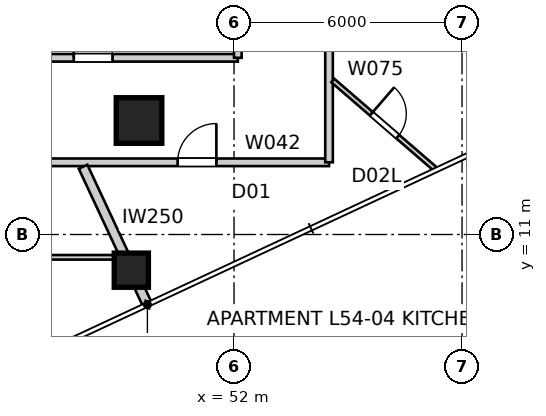
"""IFC4 building model, lengths in metres.
Left out: names, types, materials, properties, quantities, classifications, styles, units other than length and angle.
Written with IfcOpenShell. Run it as: python <this file> out.ifc"""

import sys

from ifc_helpers import new_model, si_unit, direction, frame, frame_2d, origin, origin_2d, place, context, subcontext, project, spatial, rectangle, extrude, element, fill, save


model = new_model("IFC4")
c1 = context("Model", 3, precision=1e-05, world=origin(), true_north=direction((0.0, 1.0)))
c2 = subcontext(c1, "Body", "Model", "MODEL_VIEW")
j1 = project(units=[si_unit("LENGTHUNIT", "METRE"), si_unit("PLANEANGLEUNIT", "RADIAN")], contexts=[c1])
p1 = place(None, origin())
s1 = spatial("IfcSite", under=j1, at=p1, CompositionType="ELEMENT")
p2 = place(p1, origin())
s2 = spatial("IfcBuilding", under=s1, at=p2, CompositionType="ELEMENT")
p3 = place(p2, frame((0.0, 0.0, 196.4)))
s3 = spatial("IfcBuildingStorey", under=s2, at=p3, CompositionType="ELEMENT", Elevation=196.4)
p4 = place(p3, frame((49.298, 10.061, 0.0), z_axis=(0.0, 0.0, 1.0), x_axis=(1.0, 0.0, 0.0)))
e1 = element("IfcColumn", 1, at=p4, inside=s3, PredefinedType="COLUMN", context=c2, shape_type="SweptSolid", body=[
    extrude(rectangle(XDim=0.9, YDim=0.9, at=origin_2d()), origin(), (0.0, 0.0, 1.0), 3.4),
])
p5 = place(p3, frame((49.5, 14.0, 0.0), z_axis=(0.0, 0.0, 1.0), x_axis=(1.0, 0.0, 0.0)))
e2 = element("IfcColumn", 2, at=p5, inside=s3, PredefinedType="COLUMN", context=c2, shape_type="SweptSolid", body=[
    extrude(rectangle(XDim=1.2, YDim=1.2, at=origin_2d()), origin(), (0.0, 0.0, 1.0), 3.4),
])
p6 = place(p3, frame((46.308, 12.9, 0.0), z_axis=(0.0, 0.0, 1.0), x_axis=(1.0, 0.0, 0.0)))
e3 = element("IfcWall", 3, at=p6, inside=s3, PredefinedType="PARTITIONING", context=c2, shape_type="SweptSolid", body=[
    extrude(rectangle(XDim=8.192, YDim=0.2, at=frame_2d((4.096, 0.0))), origin(), (0.0, 0.0, 1.0), 3.25),
])
p7 = place(p6, frame((4.207, 0.0, 0.0)))
e4 = element("IfcOpeningElement", 4, at=p7, cuts=e3, PredefinedType="OPENING", context=c2, shape_type="SweptSolid", body=[
    extrude(rectangle(XDim=1.02, YDim=2.34, at=frame_2d((0.51, 1.17))), frame((0.0, 0.11, 0.0), z_axis=(0.0, -1.0, 0.0), x_axis=(1.0, 0.0, 0.0)), (0.0, 0.0, 1.0), 0.22),
])
p8 = place(p3, frame((54.5, 12.9, 0.0), z_axis=(0.0, 0.0, 1.0), x_axis=(0.0, 1.0, 0.0)))
e5 = element("IfcWall", 5, at=p8, inside=s3, PredefinedType="PARTITIONING", context=c2, shape_type="SweptSolid", body=[
    extrude(rectangle(XDim=33.8, YDim=0.2, at=frame_2d((16.9, 0.0))), origin(), (0.0, 0.0, 1.0), 3.25),
])
p9 = place(p8, frame((24.911, 0.0, 0.0)))
e6 = element("IfcOpeningElement", 6, at=p9, cuts=e5, PredefinedType="OPENING", context=c2, shape_type="SweptSolid", body=[
    extrude(rectangle(XDim=1.02, YDim=2.34, at=frame_2d((0.51, 1.17))), frame((0.0, 0.11, 0.0), z_axis=(0.0, -1.0, 0.0), x_axis=(1.0, 0.0, 0.0)), (0.0, 0.0, 1.0), 0.22),
])
p10 = place(p8, frame((14.759, 0.0, 0.0)))
e7 = element("IfcOpeningElement", 7, at=p10, cuts=e5, PredefinedType="OPENING", context=c2, shape_type="SweptSolid", body=[
    extrude(rectangle(XDim=1.02, YDim=2.34, at=frame_2d((0.51, 1.17))), frame((0.0, 0.11, 0.0), z_axis=(0.0, -1.0, 0.0), x_axis=(1.0, 0.0, 0.0)), (0.0, 0.0, 1.0), 0.22),
])
p11 = place(p3, frame((49.72, 9.155, 0.0), z_axis=(0.0, 0.0, 1.0), x_axis=(-0.422605017068, 0.906313963011, 0.0)))
e8 = element("IfcWall", 8, at=p11, inside=s3, PredefinedType="PARTITIONING", context=c2, shape_type="SweptSolid", body=[
    extrude(rectangle(XDim=4.003, YDim=0.25, at=frame_2d((2.002, 0.0))), origin(), (0.0, 0.0, 1.0), 3.25),
])
p12 = place(p3, frame((27.9, 15.65, 0.0), z_axis=(0.0, 0.0, 1.0), x_axis=(1.0, 0.0, 0.0)))
e9 = element("IfcWall", 9, at=p12, inside=s3, PredefinedType="PARTITIONING", context=c2, shape_type="SweptSolid", body=[
    extrude(rectangle(XDim=24.2, YDim=0.2, at=frame_2d((12.1, 0.0))), origin(), (0.0, 0.0, 1.0), 3.25),
])
p13 = place(p12, frame((12.437, 0.0, 0.0)))
e10 = element("IfcOpeningElement", 10, at=p13, cuts=e9, PredefinedType="OPENING", context=c2, shape_type="SweptSolid", body=[
    extrude(rectangle(XDim=1.02, YDim=2.1, at=frame_2d((0.51, 1.05))), frame((0.0, 0.11, 0.0), z_axis=(0.0, -1.0, 0.0), x_axis=(1.0, 0.0, 0.0)), (0.0, 0.0, 1.0), 0.22),
])
p14 = place(p12, frame((3.544, 0.0, 0.0)))
e11 = element("IfcOpeningElement", 11, at=p14, cuts=e9, PredefinedType="OPENING", context=c2, shape_type="SweptSolid", body=[
    extrude(rectangle(XDim=1.02, YDim=2.1, at=frame_2d((0.51, 1.05))), frame((0.0, 0.11, 0.0), z_axis=(0.0, -1.0, 0.0), x_axis=(1.0, 0.0, 0.0)), (0.0, 0.0, 1.0), 0.22),
])
p15 = place(p12, frame((19.883, 0.0, 0.0)))
e12 = element("IfcOpeningElement", 12, at=p15, cuts=e9, PredefinedType="OPENING", context=c2, shape_type="SweptSolid", body=[
    extrude(rectangle(XDim=1.02, YDim=2.1, at=frame_2d((0.51, 1.05))), frame((0.0, 0.11, 0.0), z_axis=(0.0, -1.0, 0.0), x_axis=(1.0, 0.0, 0.0)), (0.0, 0.0, 1.0), 0.22),
])
p16 = place(p3, frame((52.1, 15.65, 0.0), z_axis=(0.0, 0.0, 1.0), x_axis=(0.0, 1.0, 0.0)))
e13 = element("IfcWall", 13, at=p16, inside=s3, PredefinedType="PARTITIONING", context=c2, shape_type="SweptSolid", body=[
    extrude(rectangle(XDim=3.17, YDim=0.2, at=frame_2d((1.585, 0.0))), origin(), (0.0, 0.0, 1.0), 3.25),
])
p17 = place(p3, frame((49.14, 10.4, 0.0), z_axis=(0.0, 0.0, 1.0), x_axis=(-1.0, 0.0, 0.0)))
e14 = element("IfcWall", 14, at=p17, inside=s3, PredefinedType="PARTITIONING", context=c2, shape_type="SweptSolid", body=[
    extrude(rectangle(XDim=25.333, YDim=0.12, at=frame_2d((12.667, 0.0))), origin(), (0.0, 0.0, 1.0), 3.25),
])
p18 = place(p17, frame((2.188, 0.0, 0.0)))
e15 = element("IfcOpeningElement", 15, at=p18, cuts=e14, PredefinedType="OPENING", context=c2, shape_type="SweptSolid", body=[
    extrude(rectangle(XDim=0.92, YDim=2.34, at=frame_2d((0.46, 1.17))), frame((0.0, 0.07, 0.0), z_axis=(0.0, -1.0, 0.0), x_axis=(1.0, 0.0, 0.0)), (0.0, 0.0, 1.0), 0.14),
])
p19 = place(p17, frame((21.46, 0.0, 0.0)))
e16 = element("IfcOpeningElement", 16, at=p19, cuts=e14, PredefinedType="OPENING", context=c2, shape_type="SweptSolid", body=[
    extrude(rectangle(XDim=0.92, YDim=2.34, at=frame_2d((0.46, 1.17))), frame((0.0, 0.07, 0.0), z_axis=(0.0, -1.0, 0.0), x_axis=(1.0, 0.0, 0.0)), (0.0, 0.0, 1.0), 0.14),
])
p20 = place(p17, frame((8.035, 0.0, 0.0)))
e17 = element("IfcOpeningElement", 17, at=p20, cuts=e14, PredefinedType="OPENING", context=c2, shape_type="SweptSolid", body=[
    extrude(rectangle(XDim=0.96, YDim=2.1, at=frame_2d((0.48, 1.05))), frame((0.0, 0.07, 0.0), z_axis=(0.0, -1.0, 0.0), x_axis=(1.0, 0.0, 0.0)), (0.0, 0.0, 1.0), 0.14),
])
p21 = place(p17, frame((16.14, 0.0, 0.0)))
e18 = element("IfcOpeningElement", 18, at=p21, cuts=e14, PredefinedType="OPENING", context=c2, shape_type="SweptSolid", body=[
    extrude(rectangle(XDim=0.96, YDim=2.1, at=frame_2d((0.48, 1.05))), frame((0.0, 0.07, 0.0), z_axis=(0.0, -1.0, 0.0), x_axis=(1.0, 0.0, 0.0)), (0.0, 0.0, 1.0), 0.14),
])
p22 = place(p17, frame((12.283, 0.0, 0.0)))
e19 = element("IfcOpeningElement", 19, at=p22, cuts=e14, PredefinedType="OPENING", context=c2, shape_type="SweptSolid", body=[
    extrude(rectangle(XDim=0.96, YDim=2.1, at=frame_2d((0.48, 1.05))), frame((0.0, 0.07, 0.0), z_axis=(0.0, -1.0, 0.0), x_axis=(1.0, 0.0, 0.0)), (0.0, 0.0, 1.0), 0.14),
])
p23 = place(p3, frame((54.6, 15.052, 0.0), z_axis=(0.0, 0.0, 1.0), x_axis=(0.756558808476, -0.653925660391, 0.0)))
e20 = element("IfcWall", 20, at=p23, inside=s3, PredefinedType="PARTITIONING", context=c2, shape_type="SweptSolid", body=[
    extrude(rectangle(XDim=3.554, YDim=0.12, at=frame_2d((1.777, 0.0))), origin(), (0.0, 0.0, 1.0), 3.25),
])
p24 = place(p23, frame((1.339, 0.0, 0.0)))
e21 = element("IfcOpeningElement", 21, at=p24, cuts=e20, PredefinedType="OPENING", context=c2, shape_type="SweptSolid", body=[
    extrude(rectangle(XDim=0.92, YDim=2.1, at=frame_2d((0.46, 1.05))), frame((0.0, 0.07, 0.0), z_axis=(0.0, -1.0, 0.0), x_axis=(1.0, 0.0, 0.0)), (0.0, 0.0, 1.0), 0.14),
])
p25 = place(p7, origin())
e22 = element("IfcDoor", 22, at=p25, inside=s3, OperationType="SINGLE_SWING_RIGHT", PredefinedType="DOOR", context=c2, shape_type="SweptSolid", body=[
    extrude(rectangle(XDim=1.02, YDim=2.34, at=frame_2d((0.51, 1.17))), frame((0.0, 0.025, 0.0), z_axis=(0.0, -1.0, 0.0), x_axis=(1.0, 0.0, 0.0)), (0.0, 0.0, 1.0), 0.05),
])
fill(e4, e22)
p26 = place(p15, origin())
e23 = element("IfcDoor", 23, at=p26, inside=s3, OperationType="SINGLE_SWING_LEFT", PredefinedType="DOOR", context=c2, shape_type="SweptSolid", body=[
    extrude(rectangle(XDim=1.02, YDim=2.1, at=frame_2d((0.51, 1.05))), frame((0.0, 0.025, 0.0), z_axis=(0.0, -1.0, 0.0), x_axis=(1.0, 0.0, 0.0)), (0.0, 0.0, 1.0), 0.05),
])
fill(e12, e23)
p27 = place(p24, origin())
e24 = element("IfcDoor", 24, at=p27, inside=s3, OperationType="SINGLE_SWING_LEFT", PredefinedType="DOOR", context=c2, shape_type="SweptSolid", body=[
    extrude(rectangle(XDim=0.92, YDim=2.1, at=frame_2d((0.46, 1.05))), frame((0.0, 0.025, 0.0), z_axis=(0.0, -1.0, 0.0), x_axis=(1.0, 0.0, 0.0)), (0.0, 0.0, 1.0), 0.05),
])
fill(e21, e24)
save(model, sys.argv[1])
